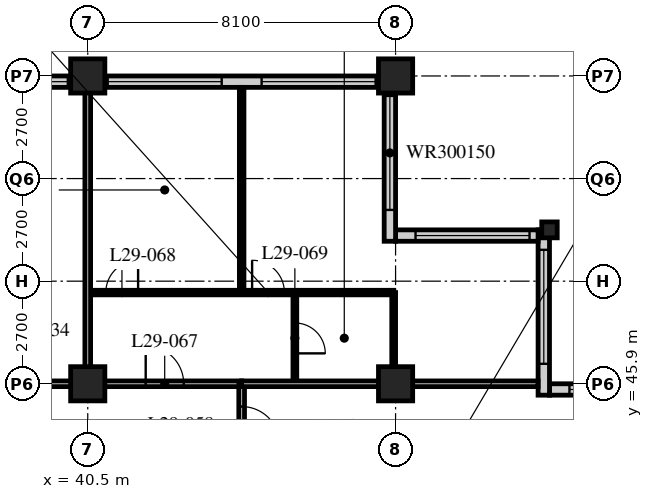
"""IFC4 building model, lengths in metres.
Left out: names, types, materials, properties, quantities, classifications, styles, units other than length and angle.
Written with IfcOpenShell. Run it as: python <this file> out.ifc"""

import sys

from ifc_helpers import new_model, si_unit, direction, frame, frame_2d, origin, origin_2d, place, context, subcontext, project, spatial, rectangle, hollow_rectangle, i_section, extrude, element, fill, save


model = new_model("IFC4")
c1 = context("Model", 3, precision=1e-05, world=origin(), true_north=direction((0.0, 1.0)))
c2 = subcontext(c1, "Body", "Model", "MODEL_VIEW")
j1 = project(units=[si_unit("LENGTHUNIT", "METRE"), si_unit("PLANEANGLEUNIT", "RADIAN")], contexts=[c1])
p1 = place(None, origin())
s1 = spatial("IfcSite", under=j1, at=p1, CompositionType="ELEMENT")
p2 = place(p1, origin())
s2 = spatial("IfcBuilding", under=s1, at=p2, CompositionType="ELEMENT")
p3 = place(p2, frame((0.0, 0.0, 117.0)))
s3 = spatial("IfcBuildingStorey", under=s2, at=p3, CompositionType="ELEMENT", Elevation=117.0)
for number, where, z_axis, x_axis in (
    (1, (40.5, 45.9, 0.0), (0.0, 0.0, 1.0), (1.0, 0.0, 0.0)),
    (2, (40.5, 54.0, 0.0), (0.0, 0.0, 1.0), (1.0, 0.0, 0.0)),
    (3, (48.6, 45.9, 0.0), (0.0, 0.0, 1.0), (1.0, 0.0, 0.0)),
    (4, (48.6, 54.0, 0.0), (0.0, 0.0, 1.0), (1.0, 0.0, 0.0)),
):
    element("IfcColumn", number, at=place(p3, frame(where, z_axis=z_axis, x_axis=x_axis)), inside=s3, PredefinedType="COLUMN", context=c2, shape_type="SweptSolid", body=[
        extrude(hollow_rectangle(XDim=0.9, YDim=0.9, WallThickness=0.09, at=origin_2d()), origin(), (0.0, 0.0, 1.0), 3.4),
    ])
p4 = place(p3, frame((52.65, 49.95, 0.0), z_axis=(0.0, 0.0, 1.0), x_axis=(1.0, 0.0, 0.0)))
e5 = element("IfcColumn", 5, at=p4, inside=s3, PredefinedType="COLUMN", context=c2, shape_type="SweptSolid", body=[
    extrude(i_section(OverallWidth=0.407, OverallDepth=0.419, WebThickness=0.031, FlangeThickness=0.049, FilletRadius=0.015, at=origin_2d()), origin(), (0.0, 0.0, 1.0), 3.4),
])
p5 = place(p3, frame((56.4, 45.75, 0.0), z_axis=(0.0, 0.0, 1.0), x_axis=(-1.0, 0.0, 0.0)))
e6 = element("IfcWall", 6, at=p5, inside=s3, PredefinedType="SOLIDWALL", context=c2, shape_type="SweptSolid", body=[
    extrude(rectangle(XDim=3.75, YDim=0.3, at=frame_2d((1.875, 0.0))), origin(), (0.0, 0.0, 1.0), 3.19),
])
p6 = place(p5, frame((0.225, 0.0, 0.9)))
e7 = element("IfcOpeningElement", 7, at=p6, cuts=e6, PredefinedType="OPENING", context=c2, shape_type="SweptSolid", body=[
    extrude(rectangle(XDim=3.0, YDim=1.5, at=frame_2d((1.5, 0.75))), frame((0.0, 0.16, 0.0), z_axis=(0.0, -1.0, 0.0), x_axis=(1.0, 0.0, 0.0)), (0.0, 0.0, 1.0), 0.32),
])
p7 = place(p3, frame((52.5, 45.6, 0.0), z_axis=(0.0, 0.0, 1.0), x_axis=(0.0, 1.0, 0.0)))
e8 = element("IfcWall", 8, at=p7, inside=s3, PredefinedType="SOLIDWALL", context=c2, shape_type="SweptSolid", body=[
    extrude(rectangle(XDim=4.35, YDim=0.3, at=frame_2d((2.175, 0.0))), origin(), (0.0, 0.0, 1.0), 3.19),
])
p8 = place(p7, frame((0.825, 0.0, 0.9)))
e9 = element("IfcOpeningElement", 9, at=p8, cuts=e8, PredefinedType="OPENING", context=c2, shape_type="SweptSolid", body=[
    extrude(rectangle(XDim=3.0, YDim=1.5, at=frame_2d((1.5, 0.75))), frame((0.0, 0.16, 0.0), z_axis=(0.0, -1.0, 0.0), x_axis=(1.0, 0.0, 0.0)), (0.0, 0.0, 1.0), 0.32),
])
p9 = place(p3, frame((52.35, 49.8, 0.0), z_axis=(0.0, 0.0, 1.0), x_axis=(-1.0, 0.0, 0.0)))
e10 = element("IfcWall", 10, at=p9, inside=s3, PredefinedType="SOLIDWALL", context=c2, shape_type="SweptSolid", body=[
    extrude(rectangle(XDim=3.75, YDim=0.3, at=frame_2d((1.875, 0.0))), origin(), (0.0, 0.0, 1.0), 3.19),
])
p10 = place(p9, frame((0.225, 0.0, 0.9)))
e11 = element("IfcOpeningElement", 11, at=p10, cuts=e10, PredefinedType="OPENING", context=c2, shape_type="SweptSolid", body=[
    extrude(rectangle(XDim=3.0, YDim=1.5, at=frame_2d((1.5, 0.75))), frame((0.0, 0.16, 0.0), z_axis=(0.0, -1.0, 0.0), x_axis=(1.0, 0.0, 0.0)), (0.0, 0.0, 1.0), 0.32),
])
p11 = place(p3, frame((48.45, 49.65, 0.0), z_axis=(0.0, 0.0, 1.0), x_axis=(0.0, 1.0, 0.0)))
e12 = element("IfcWall", 12, at=p11, inside=s3, PredefinedType="SOLIDWALL", context=c2, shape_type="SweptSolid", body=[
    extrude(rectangle(XDim=4.35, YDim=0.3, at=frame_2d((2.175, 0.0))), origin(), (0.0, 0.0, 1.0), 3.19),
])
p12 = place(p11, frame((0.825, 0.0, 0.9)))
e13 = element("IfcOpeningElement", 13, at=p12, cuts=e12, PredefinedType="OPENING", context=c2, shape_type="SweptSolid", body=[
    extrude(rectangle(XDim=3.0, YDim=1.5, at=frame_2d((1.5, 0.75))), frame((0.0, 0.16, 0.0), z_axis=(0.0, -1.0, 0.0), x_axis=(1.0, 0.0, 0.0)), (0.0, 0.0, 1.0), 0.32),
])
p13 = place(p3, frame((48.3, 53.85, 0.0), z_axis=(0.0, 0.0, 1.0), x_axis=(-1.0, 0.0, 0.0)))
e14 = element("IfcWall", 14, at=p13, inside=s3, PredefinedType="SOLIDWALL", context=c2, shape_type="SweptSolid", body=[
    extrude(rectangle(XDim=40.2, YDim=0.3, at=frame_2d((20.1, 0.0))), origin(), (0.0, 0.0, 1.0), 3.19),
])
p14 = place(p13, frame((0.225, 0.0, 0.9)))
e15 = element("IfcOpeningElement", 15, at=p14, cuts=e14, PredefinedType="OPENING", context=c2, shape_type="SweptSolid", body=[
    extrude(rectangle(XDim=3.0, YDim=2.0, at=frame_2d((1.5, 1.0))), frame((0.0, 0.16, 0.0), z_axis=(0.0, -1.0, 0.0), x_axis=(1.0, 0.0, 0.0)), (0.0, 0.0, 1.0), 0.32),
])
p15 = place(p13, frame((4.275, 0.0, 0.9)))
e16 = element("IfcOpeningElement", 16, at=p15, cuts=e14, PredefinedType="OPENING", context=c2, shape_type="SweptSolid", body=[
    extrude(rectangle(XDim=3.0, YDim=2.0, at=frame_2d((1.5, 1.0))), frame((0.0, 0.16, 0.0), z_axis=(0.0, -1.0, 0.0), x_axis=(1.0, 0.0, 0.0)), (0.0, 0.0, 1.0), 0.32),
])
p16 = place(p13, frame((8.325, 0.0, 0.9)))
e17 = element("IfcOpeningElement", 17, at=p16, cuts=e14, PredefinedType="OPENING", context=c2, shape_type="SweptSolid", body=[
    extrude(rectangle(XDim=3.0, YDim=2.0, at=frame_2d((1.5, 1.0))), frame((0.0, 0.16, 0.0), z_axis=(0.0, -1.0, 0.0), x_axis=(1.0, 0.0, 0.0)), (0.0, 0.0, 1.0), 0.32),
])
p17 = place(p13, frame((12.375, 0.0, 0.9)))
e18 = element("IfcOpeningElement", 18, at=p17, cuts=e14, PredefinedType="OPENING", context=c2, shape_type="SweptSolid", body=[
    extrude(rectangle(XDim=3.0, YDim=2.0, at=frame_2d((1.5, 1.0))), frame((0.0, 0.16, 0.0), z_axis=(0.0, -1.0, 0.0), x_axis=(1.0, 0.0, 0.0)), (0.0, 0.0, 1.0), 0.32),
])
p18 = place(p13, frame((16.425, 0.0, 0.9)))
e19 = element("IfcOpeningElement", 19, at=p18, cuts=e14, PredefinedType="OPENING", context=c2, shape_type="SweptSolid", body=[
    extrude(rectangle(XDim=3.0, YDim=2.0, at=frame_2d((1.5, 1.0))), frame((0.0, 0.16, 0.0), z_axis=(0.0, -1.0, 0.0), x_axis=(1.0, 0.0, 0.0)), (0.0, 0.0, 1.0), 0.32),
])
p19 = place(p13, frame((20.475, 0.0, 0.9)))
e20 = element("IfcOpeningElement", 20, at=p19, cuts=e14, PredefinedType="OPENING", context=c2, shape_type="SweptSolid", body=[
    extrude(rectangle(XDim=3.0, YDim=2.0, at=frame_2d((1.5, 1.0))), frame((0.0, 0.16, 0.0), z_axis=(0.0, -1.0, 0.0), x_axis=(1.0, 0.0, 0.0)), (0.0, 0.0, 1.0), 0.32),
])
p20 = place(p13, frame((24.525, 0.0, 0.9)))
e21 = element("IfcOpeningElement", 21, at=p20, cuts=e14, PredefinedType="OPENING", context=c2, shape_type="SweptSolid", body=[
    extrude(rectangle(XDim=3.0, YDim=2.0, at=frame_2d((1.5, 1.0))), frame((0.0, 0.16, 0.0), z_axis=(0.0, -1.0, 0.0), x_axis=(1.0, 0.0, 0.0)), (0.0, 0.0, 1.0), 0.32),
])
p21 = place(p13, frame((28.575, 0.0, 0.9)))
e22 = element("IfcOpeningElement", 22, at=p21, cuts=e14, PredefinedType="OPENING", context=c2, shape_type="SweptSolid", body=[
    extrude(rectangle(XDim=3.0, YDim=2.0, at=frame_2d((1.5, 1.0))), frame((0.0, 0.16, 0.0), z_axis=(0.0, -1.0, 0.0), x_axis=(1.0, 0.0, 0.0)), (0.0, 0.0, 1.0), 0.32),
])
p22 = place(p13, frame((32.625, 0.0, 0.9)))
e23 = element("IfcOpeningElement", 23, at=p22, cuts=e14, PredefinedType="OPENING", context=c2, shape_type="SweptSolid", body=[
    extrude(rectangle(XDim=3.0, YDim=2.0, at=frame_2d((1.5, 1.0))), frame((0.0, 0.16, 0.0), z_axis=(0.0, -1.0, 0.0), x_axis=(1.0, 0.0, 0.0)), (0.0, 0.0, 1.0), 0.32),
])
p23 = place(p13, frame((36.675, 0.0, 0.9)))
e24 = element("IfcOpeningElement", 24, at=p23, cuts=e14, PredefinedType="OPENING", context=c2, shape_type="SweptSolid", body=[
    extrude(rectangle(XDim=3.0, YDim=2.0, at=frame_2d((1.5, 1.0))), frame((0.0, 0.16, 0.0), z_axis=(0.0, -1.0, 0.0), x_axis=(1.0, 0.0, 0.0)), (0.0, 0.0, 1.0), 0.32),
])
p24 = place(p3, frame((12.15, 45.9, 0.0), z_axis=(0.0, 0.0, 1.0), x_axis=(1.0, 0.0, 0.0)))
e25 = element("IfcWall", 25, at=p24, inside=s3, PredefinedType="PARTITIONING", context=c2, shape_type="SweptSolid", body=[
    extrude(rectangle(XDim=32.4, YDim=0.15, at=frame_2d((16.2, 0.0))), origin(), (0.0, 0.0, 1.0), 2.578),
])
p25 = place(p24, frame((5.95, 0.0, 0.0)))
e26 = element("IfcOpeningElement", 26, at=p25, cuts=e25, PredefinedType="OPENING", context=c2, shape_type="SweptSolid", body=[
    extrude(rectangle(XDim=1.0, YDim=2.1, at=frame_2d((0.5, 1.05))), frame((0.0, 0.085, 0.0), z_axis=(0.0, -1.0, 0.0), x_axis=(1.0, 0.0, 0.0)), (0.0, 0.0, 1.0), 0.17),
])
p26 = place(p24, frame((14.05, 0.0, 0.0)))
e27 = element("IfcOpeningElement", 27, at=p26, cuts=e25, PredefinedType="OPENING", context=c2, shape_type="SweptSolid", body=[
    extrude(rectangle(XDim=1.0, YDim=2.1, at=frame_2d((0.5, 1.05))), frame((0.0, 0.085, 0.0), z_axis=(0.0, -1.0, 0.0), x_axis=(1.0, 0.0, 0.0)), (0.0, 0.0, 1.0), 0.17),
])
p27 = place(p24, frame((25.7, 0.0, 0.0)))
e28 = element("IfcOpeningElement", 28, at=p27, cuts=e25, PredefinedType="OPENING", context=c2, shape_type="SweptSolid", body=[
    extrude(rectangle(XDim=1.0, YDim=2.1, at=frame_2d((0.5, 1.05))), frame((0.0, 0.085, 0.0), z_axis=(0.0, -1.0, 0.0), x_axis=(1.0, 0.0, 0.0)), (0.0, 0.0, 1.0), 0.17),
])
p28 = place(p24, frame((29.875, 0.0, 0.0)))
e29 = element("IfcOpeningElement", 29, at=p28, cuts=e25, PredefinedType="OPENING", context=c2, shape_type="SweptSolid", body=[
    extrude(rectangle(XDim=1.0, YDim=2.1, at=frame_2d((0.5, 1.05))), frame((0.0, 0.085, 0.0), z_axis=(0.0, -1.0, 0.0), x_axis=(1.0, 0.0, 0.0)), (0.0, 0.0, 1.0), 0.17),
])
p29 = place(p24, frame((1.525, 0.0, 0.0)))
e30 = element("IfcOpeningElement", 30, at=p29, cuts=e25, PredefinedType="OPENING", context=c2, shape_type="SweptSolid", body=[
    extrude(rectangle(XDim=1.0, YDim=2.1, at=frame_2d((0.5, 1.05))), frame((0.0, 0.085, 0.0), z_axis=(0.0, -1.0, 0.0), x_axis=(1.0, 0.0, 0.0)), (0.0, 0.0, 1.0), 0.17),
])
p30 = place(p3, frame((44.55, 17.55, 0.0), z_axis=(0.0, 0.0, 1.0), x_axis=(0.0, 1.0, 0.0)))
e31 = element("IfcWall", 31, at=p30, inside=s3, PredefinedType="PARTITIONING", context=c2, shape_type="SweptSolid", body=[
    extrude(rectangle(XDim=28.35, YDim=0.15, at=frame_2d((14.175, 0.0))), origin(), (0.0, 0.0, 1.0), 3.19),
])
p31 = place(p30, frame((2.75, 0.0, 0.0)))
e32 = element("IfcOpeningElement", 32, at=p31, cuts=e31, PredefinedType="OPENING", context=c2, shape_type="SweptSolid", body=[
    extrude(rectangle(XDim=1.0, YDim=2.1, at=frame_2d((0.5, 1.05))), frame((0.0, 0.085, 0.0), z_axis=(0.0, -1.0, 0.0), x_axis=(1.0, 0.0, 0.0)), (0.0, 0.0, 1.0), 0.17),
])
p32 = place(p30, frame((6.5, 0.0, 0.0)))
e33 = element("IfcOpeningElement", 33, at=p32, cuts=e31, PredefinedType="OPENING", context=c2, shape_type="SweptSolid", body=[
    extrude(rectangle(XDim=1.0, YDim=2.1, at=frame_2d((0.5, 1.05))), frame((0.0, 0.085, 0.0), z_axis=(0.0, -1.0, 0.0), x_axis=(1.0, 0.0, 0.0)), (0.0, 0.0, 1.0), 0.17),
])
p33 = place(p30, frame((10.0, 0.0, 0.0)))
e34 = element("IfcOpeningElement", 34, at=p33, cuts=e31, PredefinedType="OPENING", context=c2, shape_type="SweptSolid", body=[
    extrude(rectangle(XDim=1.0, YDim=2.1, at=frame_2d((0.5, 1.05))), frame((0.0, 0.085, 0.0), z_axis=(0.0, -1.0, 0.0), x_axis=(1.0, 0.0, 0.0)), (0.0, 0.0, 1.0), 0.17),
])
p34 = place(p30, frame((21.65, 0.0, 0.0)))
e35 = element("IfcOpeningElement", 35, at=p34, cuts=e31, PredefinedType="OPENING", context=c2, shape_type="SweptSolid", body=[
    extrude(rectangle(XDim=1.0, YDim=2.1, at=frame_2d((0.5, 1.05))), frame((0.0, 0.085, 0.0), z_axis=(0.0, -1.0, 0.0), x_axis=(1.0, 0.0, 0.0)), (0.0, 0.0, 1.0), 0.17),
])
p35 = place(p30, frame((26.75, 0.0, 0.0)))
e36 = element("IfcOpeningElement", 36, at=p35, cuts=e31, PredefinedType="OPENING", context=c2, shape_type="SweptSolid", body=[
    extrude(rectangle(XDim=1.0, YDim=2.1, at=frame_2d((0.5, 1.05))), frame((0.0, 0.085, 0.0), z_axis=(0.0, -1.0, 0.0), x_axis=(1.0, 0.0, 0.0)), (0.0, 0.0, 1.0), 0.17),
])
p36 = place(p3, frame((40.5, 48.3, 0.0), z_axis=(0.0, 0.0, 1.0), x_axis=(1.0, 0.0, 0.0)))
e37 = element("IfcWall", 37, at=p36, inside=s3, PredefinedType="PARTITIONING", context=c2, shape_type="SweptSolid", body=[
    extrude(rectangle(XDim=8.05, YDim=0.12, at=frame_2d((4.025, 0.0))), origin(), (0.0, 0.0, 1.0), 3.19),
])
p37 = place(p36, frame((0.475, 0.0, 0.0)))
e38 = element("IfcOpeningElement", 38, at=p37, cuts=e37, PredefinedType="OPENING", context=c2, shape_type="SweptSolid", body=[
    extrude(rectangle(XDim=0.85, YDim=2.1, at=frame_2d((0.425, 1.05))), frame((0.0, 0.07, 0.0), z_axis=(0.0, -1.0, 0.0), x_axis=(1.0, 0.0, 0.0)), (0.0, 0.0, 1.0), 0.14),
])
p38 = place(p36, frame((4.325, 0.0, 0.0)))
e39 = element("IfcOpeningElement", 39, at=p38, cuts=e37, PredefinedType="OPENING", context=c2, shape_type="SweptSolid", body=[
    extrude(rectangle(XDim=0.85, YDim=2.1, at=frame_2d((0.425, 1.05))), frame((0.0, 0.07, 0.0), z_axis=(0.0, -1.0, 0.0), x_axis=(1.0, 0.0, 0.0)), (0.0, 0.0, 1.0), 0.14),
])
p39 = place(p3, frame((45.95, 45.9, 0.0), z_axis=(0.0, 0.0, 1.0), x_axis=(0.0, 1.0, 0.0)))
e40 = element("IfcWall", 40, at=p39, inside=s3, PredefinedType="PARTITIONING", context=c2, shape_type="SweptSolid", body=[
    extrude(rectangle(XDim=2.4, YDim=0.1, at=frame_2d((1.2, 0.0))), origin(), (0.0, 0.0, 1.0), 3.19),
])
p40 = place(p39, frame((0.8, 0.0, 0.0)))
e41 = element("IfcOpeningElement", 41, at=p40, cuts=e40, PredefinedType="OPENING", context=c2, shape_type="SweptSolid", body=[
    extrude(rectangle(XDim=0.8, YDim=2.1, at=frame_2d((0.4, 1.05))), frame((0.0, 0.06, 0.0), z_axis=(0.0, -1.0, 0.0), x_axis=(1.0, 0.0, 0.0)), (0.0, 0.0, 1.0), 0.12),
])
p41 = place(p3, frame((48.55, 45.9, 0.0), z_axis=(0.0, 0.0, 1.0), x_axis=(0.0, 1.0, 0.0)))
e42 = element("IfcWall", 42, at=p41, inside=s3, PredefinedType="PARTITIONING", context=c2, shape_type="SweptSolid", body=[
    extrude(rectangle(XDim=2.4, YDim=0.1, at=frame_2d((1.2, 0.0))), origin(), (0.0, 0.0, 1.0), 2.578),
])
p42 = place(p3, frame((44.55, 48.3, 0.0), z_axis=(0.0, 0.0, 1.0), x_axis=(0.0, 1.0, 0.0)))
e43 = element("IfcWall", 43, at=p42, inside=s3, PredefinedType="PARTITIONING", context=c2, shape_type="SweptSolid", body=[
    extrude(rectangle(XDim=5.4, YDim=0.12, at=frame_2d((2.7, 0.0))), origin(), (0.0, 0.0, 1.0), 3.19),
])
for number, where, z_axis, x_axis in (
    (44, (44.55, 45.9, 0.0), (0.0, 0.0, 1.0), (1.0, 0.0, 0.0)),
    (45, (40.5, 45.9, 0.0), (0.0, 0.0, 1.0), (0.0, 1.0, 0.0)),
):
    element("IfcWall", number, at=place(p3, frame(where, z_axis=z_axis, x_axis=x_axis)), inside=s3, PredefinedType="PARTITIONING", context=c2, shape_type="SweptSolid", body=[
        extrude(rectangle(XDim=7.8, YDim=0.15, at=frame_2d((3.9, 0.0))), origin(), (0.0, 0.0, 1.0), 2.578),
    ])
p43 = place(p6, origin())
e46 = element("IfcWindow", 46, at=p43, inside=s3, PartitioningType="SINGLE_PANEL", PredefinedType="WINDOW", context=c2, shape_type="SweptSolid", body=[
    extrude(rectangle(XDim=3.0, YDim=1.5, at=frame_2d((1.5, 0.75))), frame((0.0, 0.03, 0.0), z_axis=(0.0, -1.0, 0.0), x_axis=(1.0, 0.0, 0.0)), (0.0, 0.0, 1.0), 0.06),
])
fill(e7, e46)
p44 = place(p8, origin())
e47 = element("IfcWindow", 47, at=p44, inside=s3, PartitioningType="SINGLE_PANEL", PredefinedType="WINDOW", context=c2, shape_type="SweptSolid", body=[
    extrude(rectangle(XDim=3.0, YDim=1.5, at=frame_2d((1.5, 0.75))), frame((0.0, 0.03, 0.0), z_axis=(0.0, -1.0, 0.0), x_axis=(1.0, 0.0, 0.0)), (0.0, 0.0, 1.0), 0.06),
])
fill(e9, e47)
p45 = place(p10, origin())
e48 = element("IfcWindow", 48, at=p45, inside=s3, PartitioningType="SINGLE_PANEL", PredefinedType="WINDOW", context=c2, shape_type="SweptSolid", body=[
    extrude(rectangle(XDim=3.0, YDim=1.5, at=frame_2d((1.5, 0.75))), frame((0.0, 0.03, 0.0), z_axis=(0.0, -1.0, 0.0), x_axis=(1.0, 0.0, 0.0)), (0.0, 0.0, 1.0), 0.06),
])
fill(e11, e48)
p46 = place(p12, origin())
e49 = element("IfcWindow", 49, at=p46, inside=s3, PartitioningType="SINGLE_PANEL", PredefinedType="WINDOW", context=c2, shape_type="SweptSolid", body=[
    extrude(rectangle(XDim=3.0, YDim=1.5, at=frame_2d((1.5, 0.75))), frame((0.0, 0.03, 0.0), z_axis=(0.0, -1.0, 0.0), x_axis=(1.0, 0.0, 0.0)), (0.0, 0.0, 1.0), 0.06),
])
fill(e13, e49)
p47 = place(p14, origin())
e50 = element("IfcWindow", 50, at=p47, inside=s3, PartitioningType="SINGLE_PANEL", PredefinedType="WINDOW", context=c2, shape_type="SweptSolid", body=[
    extrude(rectangle(XDim=3.0, YDim=2.0, at=frame_2d((1.5, 1.0))), frame((0.0, 0.03, 0.0), z_axis=(0.0, -1.0, 0.0), x_axis=(1.0, 0.0, 0.0)), (0.0, 0.0, 1.0), 0.06),
])
fill(e15, e50)
p48 = place(p15, origin())
e51 = element("IfcWindow", 51, at=p48, inside=s3, PartitioningType="SINGLE_PANEL", PredefinedType="WINDOW", context=c2, shape_type="SweptSolid", body=[
    extrude(rectangle(XDim=3.0, YDim=2.0, at=frame_2d((1.5, 1.0))), frame((0.0, 0.03, 0.0), z_axis=(0.0, -1.0, 0.0), x_axis=(1.0, 0.0, 0.0)), (0.0, 0.0, 1.0), 0.06),
])
fill(e16, e51)
p49 = place(p16, origin())
e52 = element("IfcWindow", 52, at=p49, inside=s3, PartitioningType="SINGLE_PANEL", PredefinedType="WINDOW", context=c2, shape_type="SweptSolid", body=[
    extrude(rectangle(XDim=3.0, YDim=2.0, at=frame_2d((1.5, 1.0))), frame((0.0, 0.03, 0.0), z_axis=(0.0, -1.0, 0.0), x_axis=(1.0, 0.0, 0.0)), (0.0, 0.0, 1.0), 0.06),
])
fill(e17, e52)
p50 = place(p35, origin())
e53 = element("IfcDoor", 53, at=p50, inside=s3, OperationType="SINGLE_SWING_RIGHT", PredefinedType="DOOR", context=c2, shape_type="SweptSolid", body=[
    extrude(rectangle(XDim=1.0, YDim=2.1, at=frame_2d((0.5, 1.05))), frame((0.0, 0.025, 0.0), z_axis=(0.0, -1.0, 0.0), x_axis=(1.0, 0.0, 0.0)), (0.0, 0.0, 1.0), 0.05),
])
fill(e36, e53)
p51 = place(p28, origin())
e54 = element("IfcDoor", 54, at=p51, inside=s3, OperationType="SINGLE_SWING_LEFT", PredefinedType="DOOR", context=c2, shape_type="SweptSolid", body=[
    extrude(rectangle(XDim=1.0, YDim=2.1, at=frame_2d((0.5, 1.05))), frame((0.0, 0.025, 0.0), z_axis=(0.0, -1.0, 0.0), x_axis=(1.0, 0.0, 0.0)), (0.0, 0.0, 1.0), 0.05),
])
fill(e29, e54)
p52 = place(p37, origin())
e55 = element("IfcDoor", 55, at=p52, inside=s3, OperationType="SINGLE_SWING_RIGHT", PredefinedType="DOOR", context=c2, shape_type="SweptSolid", body=[
    extrude(rectangle(XDim=0.85, YDim=2.1, at=frame_2d((0.425, 1.05))), frame((0.0, 0.025, 0.0), z_axis=(0.0, -1.0, 0.0), x_axis=(1.0, 0.0, 0.0)), (0.0, 0.0, 1.0), 0.05),
])
fill(e38, e55)
p53 = place(p40, origin())
e56 = element("IfcDoor", 56, at=p53, inside=s3, OperationType="SINGLE_SWING_RIGHT", PredefinedType="DOOR", context=c2, shape_type="SweptSolid", body=[
    extrude(rectangle(XDim=0.8, YDim=2.1, at=frame_2d((0.4, 1.05))), frame((0.0, 0.025, 0.0), z_axis=(0.0, -1.0, 0.0), x_axis=(1.0, 0.0, 0.0)), (0.0, 0.0, 1.0), 0.05),
])
fill(e41, e56)
p54 = place(p38, origin())
e57 = element("IfcDoor", 57, at=p54, inside=s3, OperationType="SINGLE_SWING_LEFT", PredefinedType="DOOR", context=c2, shape_type="SweptSolid", body=[
    extrude(rectangle(XDim=0.85, YDim=2.1, at=frame_2d((0.425, 1.05))), frame((0.0, 0.025, 0.0), z_axis=(0.0, -1.0, 0.0), x_axis=(1.0, 0.0, 0.0)), (0.0, 0.0, 1.0), 0.05),
])
fill(e39, e57)
save(model, sys.argv[1])
